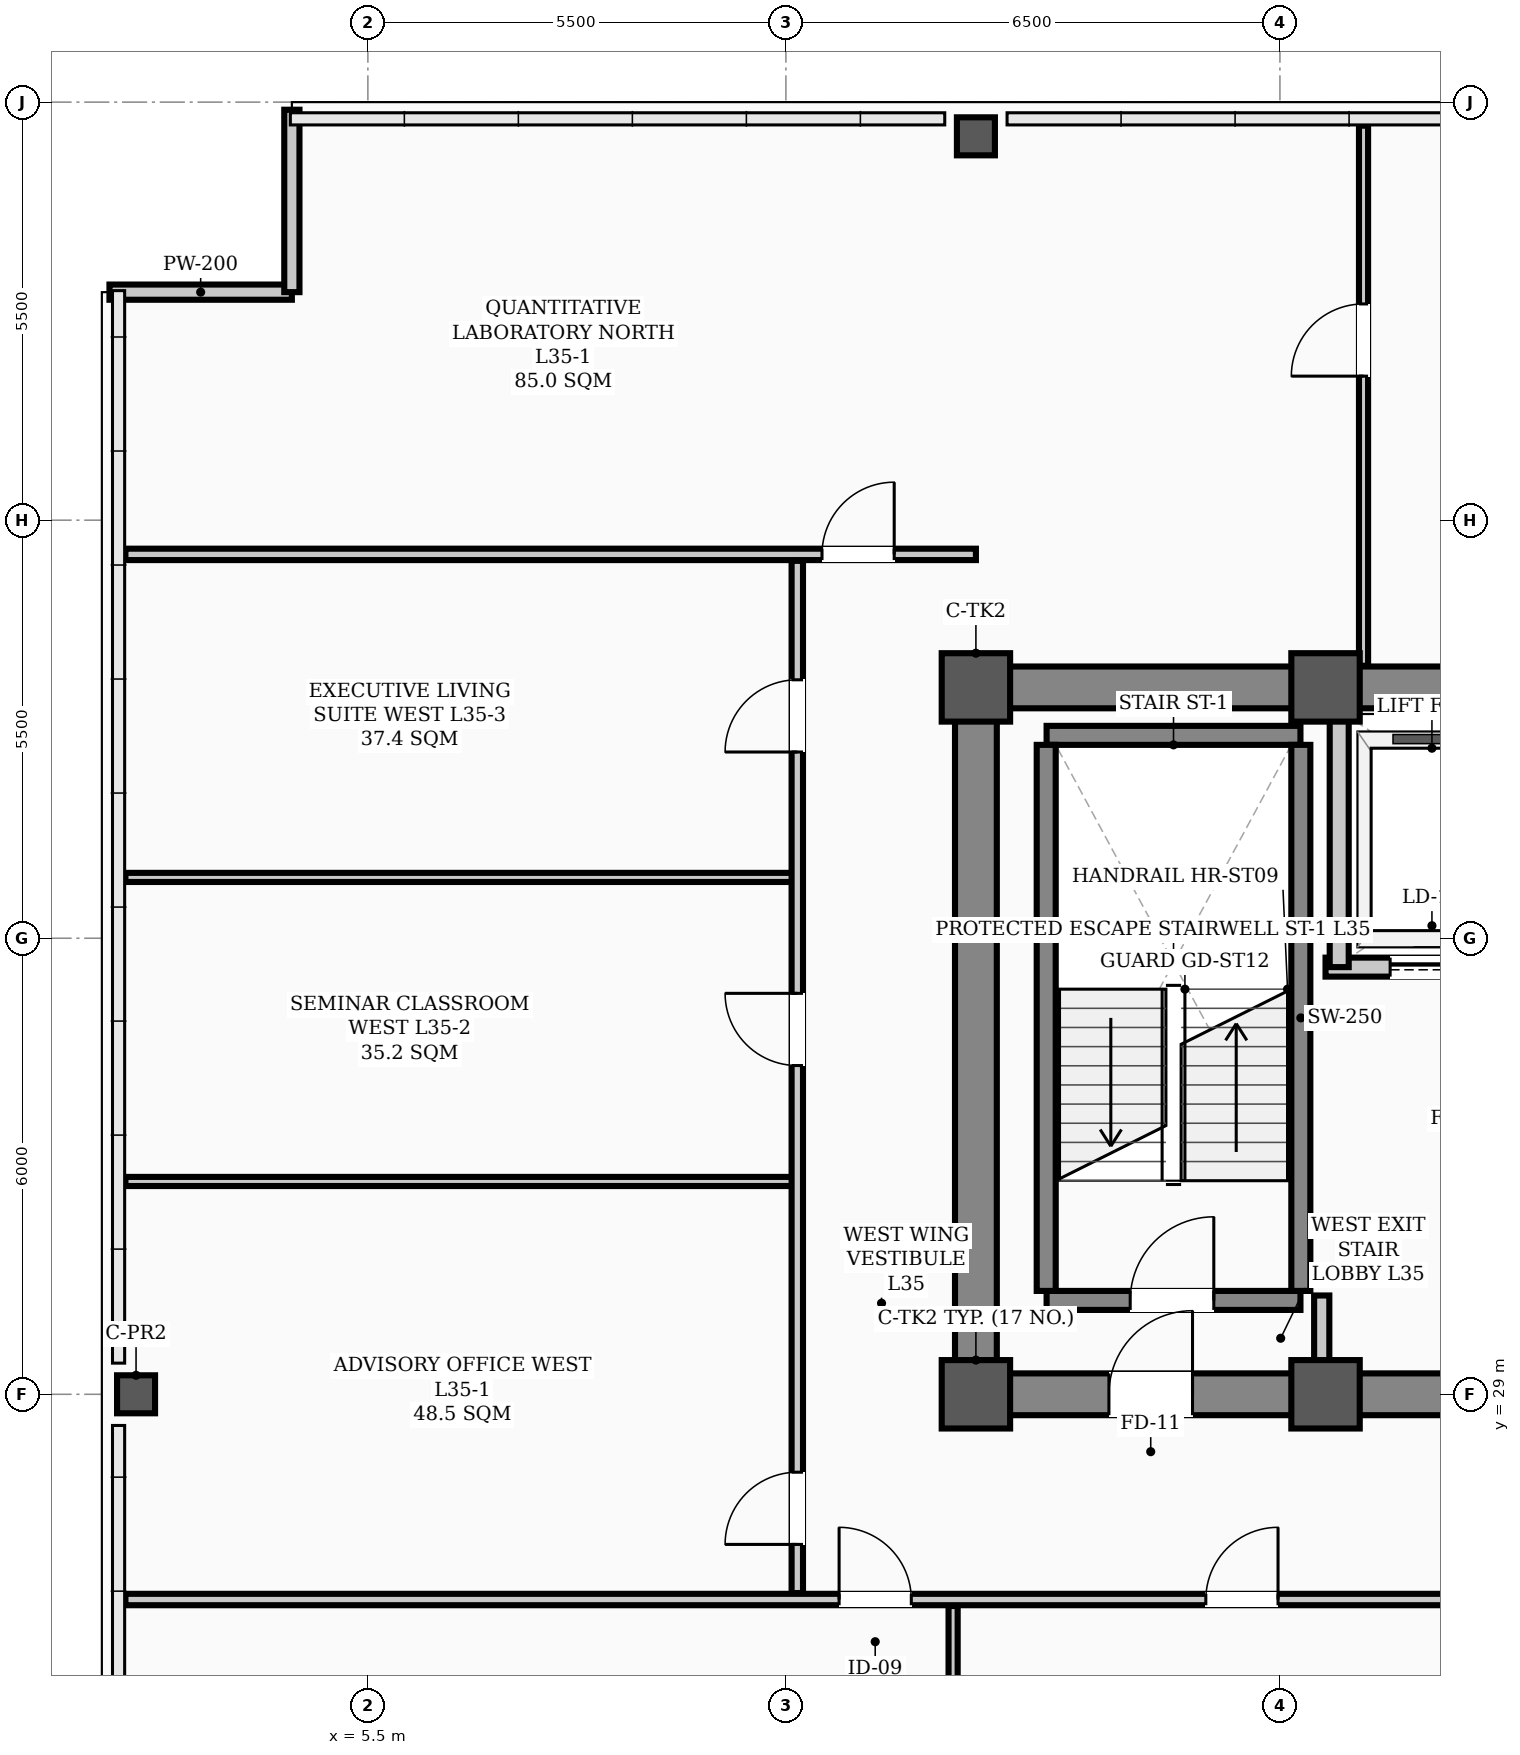
"""IFC4 building model, lengths in metres.
Left out: names, types, materials, properties, quantities, classifications, styles, units other than length and angle.
Written with IfcOpenShell. Run it as: python <this file> out.ifc"""

import sys

from ifc_helpers import new_model, si_unit, direction, frame, frame_2d, origin, origin_2d, place, context, subcontext, project, spatial, rectangle, hollow_rectangle, extrude, element, fill, save


model = new_model("IFC4")
c1 = context("Model", 3, precision=1e-05, world=origin(), true_north=direction((0.0, 1.0)))
c2 = subcontext(c1, "Body", "Model", "MODEL_VIEW")
j1 = project(units=[si_unit("LENGTHUNIT", "METRE"), si_unit("PLANEANGLEUNIT", "RADIAN")], contexts=[c1])
p1 = place(None, origin())
s1 = spatial("IfcSite", under=j1, at=p1, CompositionType="ELEMENT")
p2 = place(p1, origin())
s2 = spatial("IfcBuilding", under=s1, at=p2, CompositionType="ELEMENT")
p3 = place(p2, frame((0.0, 0.0, 142.2)))
s3 = spatial("IfcBuildingStorey", under=s2, at=p3, CompositionType="ELEMENT", Elevation=142.2)
for number, where, z_axis, x_axis in (
    (1, (13.5, 29.0, 0.0), (0.0, 0.0, 1.0), (1.0, 0.0, 0.0)),
    (2, (13.5, 38.3, 0.0), (0.0, 0.0, 1.0), (1.0, 0.0, 0.0)),
    (3, (18.1, 29.0, 0.0), (0.0, 0.0, 1.0), (1.0, 0.0, 0.0)),
    (4, (18.1, 38.3, 0.0), (0.0, 0.0, 1.0), (1.0, 0.0, 0.0)),
):
    element("IfcColumn", number, at=place(p3, frame(where, z_axis=z_axis, x_axis=x_axis)), inside=s3, PredefinedType="COLUMN", context=c2, shape_type="SweptSolid", body=[
        extrude(hollow_rectangle(XDim=0.9, YDim=0.9, WallThickness=0.035, InnerFilletRadius=0.017, OuterFilletRadius=0.052, at=origin_2d()), origin(), (0.0, 0.0, 1.0), 3.9),
    ])
for number, where, z_axis, x_axis in (
    (5, (2.45, 29.0, 0.0), (0.0, 0.0, 1.0), (1.0, 0.0, 0.0)),
    (6, (13.5, 45.55, 0.0), (0.0, 0.0, 1.0), (1.0, 0.0, 0.0)),
):
    element("IfcColumn", number, at=place(p3, frame(where, z_axis=z_axis, x_axis=x_axis)), inside=s3, PredefinedType="COLUMN", context=c2, shape_type="SweptSolid", body=[
        extrude(hollow_rectangle(XDim=0.5, YDim=0.5, WallThickness=0.024, InnerFilletRadius=0.012, OuterFilletRadius=0.036, at=origin_2d()), origin(), (0.0, 0.0, 1.0), 3.9),
    ])
for number, where, z_axis, x_axis in (
    (7, (2.1, 43.5, 0.0), (0.0, 0.0, 1.0), (1.0, 0.0, 0.0)),
    (8, (4.5, 43.5, 0.0), (0.0, 0.0, 1.0), (0.0, 1.0, 0.0)),
):
    element("IfcWall", number, at=place(p3, frame(where, z_axis=z_axis, x_axis=x_axis)), inside=s3, PredefinedType="PARAPET", context=c2, shape_type="SweptSolid", body=[
        extrude(rectangle(XDim=2.4, YDim=0.2, at=frame_2d((1.2, 0.0))), origin(), (0.0, 0.0, 1.0), 1.2),
    ])
p4 = place(p3, frame((13.5, 29.0, 0.0), z_axis=(0.0, 0.0, 1.0), x_axis=(1.0, 0.0, 0.0)))
e9 = element("IfcWall", 9, at=p4, inside=s3, PredefinedType="SHEAR", context=c2, shape_type="SweptSolid", body=[
    extrude(rectangle(XDim=30.5, YDim=0.55, at=frame_2d((15.25, 0.0))), origin(), (0.0, 0.0, 1.0), 3.72),
])
p5 = place(p4, frame((1.75, 0.0, 0.0)))
e10 = element("IfcOpeningElement", 10, at=p5, cuts=e9, PredefinedType="OPENING", context=c2, shape_type="SweptSolid", body=[
    extrude(rectangle(XDim=1.1, YDim=2.08, at=frame_2d((0.55, 1.04))), frame((0.0, 0.285, 0.0), z_axis=(0.0, -1.0, 0.0), x_axis=(1.0, 0.0, 0.0)), (0.0, 0.0, 1.0), 0.57),
])
p6 = place(p4, frame((26.7, 0.0, 0.0)))
e11 = element("IfcOpeningElement", 11, at=p6, cuts=e9, PredefinedType="OPENING", context=c2, shape_type="SweptSolid", body=[
    extrude(rectangle(XDim=1.1, YDim=2.08, at=frame_2d((0.55, 1.04))), frame((0.0, 0.285, 0.0), z_axis=(0.0, -1.0, 0.0), x_axis=(1.0, 0.0, 0.0)), (0.0, 0.0, 1.0), 0.57),
])
p7 = place(p4, frame((6.8, 0.0, 0.0)))
e12 = element("IfcOpeningElement", 12, at=p7, cuts=e9, PredefinedType="OPENING", context=c2, shape_type="SweptSolid", body=[
    extrude(rectangle(XDim=1.1, YDim=2.08, at=frame_2d((0.55, 1.04))), frame((0.0, 0.285, 0.0), z_axis=(0.0, -1.0, 0.0), x_axis=(1.0, 0.0, 0.0)), (0.0, 0.0, 1.0), 0.57),
])
p8 = place(p4, frame((13.2, 0.0, 0.0)))
e13 = element("IfcOpeningElement", 13, at=p8, cuts=e9, PredefinedType="OPENING", context=c2, shape_type="SweptSolid", body=[
    extrude(rectangle(XDim=1.6, YDim=2.08, at=frame_2d((0.8, 1.04))), frame((0.0, 0.285, 0.0), z_axis=(0.0, -1.0, 0.0), x_axis=(1.0, 0.0, 0.0)), (0.0, 0.0, 1.0), 0.57),
])
p9 = place(p4, frame((19.6, 0.0, 0.0)))
e14 = element("IfcOpeningElement", 14, at=p9, cuts=e9, PredefinedType="OPENING", context=c2, shape_type="SweptSolid", body=[
    extrude(rectangle(XDim=0.9, YDim=2.08, at=frame_2d((0.45, 1.04))), frame((0.0, 0.285, 0.0), z_axis=(0.0, -1.0, 0.0), x_axis=(1.0, 0.0, 0.0)), (0.0, 0.0, 1.0), 0.57),
])
p10 = place(p4, frame((21.6, 0.0, 0.0)))
e15 = element("IfcOpeningElement", 15, at=p10, cuts=e9, PredefinedType="OPENING", context=c2, shape_type="SweptSolid", body=[
    extrude(rectangle(XDim=0.9, YDim=2.08, at=frame_2d((0.45, 1.04))), frame((0.0, 0.285, 0.0), z_axis=(0.0, -1.0, 0.0), x_axis=(1.0, 0.0, 0.0)), (0.0, 0.0, 1.0), 0.57),
])
p11 = place(p3, frame((13.5, 38.3, 0.0), z_axis=(0.0, 0.0, 1.0), x_axis=(1.0, 0.0, 0.0)))
e16 = element("IfcWall", 16, at=p11, inside=s3, PredefinedType="SHEAR", context=c2, shape_type="SweptSolid", body=[
    extrude(rectangle(XDim=30.5, YDim=0.55, at=frame_2d((15.25, 0.0))), origin(), (0.0, 0.0, 1.0), 3.72),
])
p12 = place(p3, frame((13.5, 29.35, 0.0), z_axis=(0.0, 0.0, 1.0), x_axis=(0.0, 1.0, 0.0)))
e17 = element("IfcWall", 17, at=p12, inside=s3, PredefinedType="SHEAR", context=c2, shape_type="SweptSolid", body=[
    extrude(rectangle(XDim=8.6, YDim=0.55, at=frame_2d((4.3, 0.0))), origin(), (0.0, 0.0, 1.0), 3.72),
])
p13 = place(p3, frame((14.43, 30.235, 0.0), z_axis=(0.0, 0.0, 1.0), x_axis=(1.0, 0.0, 0.0)))
e18 = element("IfcWall", 18, at=p13, inside=s3, PredefinedType="STANDARD", context=c2, shape_type="SweptSolid", body=[
    extrude(rectangle(XDim=3.34, YDim=0.25, at=frame_2d((1.67, 0.0))), origin(), (0.0, 0.0, 1.0), 3.72),
])
p14 = place(p13, frame((1.1, 0.0, 0.0)))
e19 = element("IfcOpeningElement", 19, at=p14, cuts=e18, PredefinedType="OPENING", context=c2, shape_type="SweptSolid", body=[
    extrude(rectangle(XDim=1.1, YDim=2.08, at=frame_2d((0.55, 1.04))), frame((0.0, 0.135, 0.0), z_axis=(0.0, -1.0, 0.0), x_axis=(1.0, 0.0, 0.0)), (0.0, 0.0, 1.0), 0.27),
])
p15 = place(p3, frame((14.43, 37.669, 0.0), z_axis=(0.0, 0.0, 1.0), x_axis=(1.0, 0.0, 0.0)))
e20 = element("IfcWall", 20, at=p15, inside=s3, PredefinedType="STANDARD", context=c2, shape_type="SweptSolid", body=[
    extrude(rectangle(XDim=3.34, YDim=0.25, at=frame_2d((1.67, 0.0))), origin(), (0.0, 0.0, 1.0), 3.72),
])
for number, where, z_axis, x_axis in (
    (21, (14.425, 30.36, 0.0), (0.0, 0.0, 1.0), (0.0, 1.0, 0.0)),
    (22, (17.775, 30.36, 0.0), (0.0, 0.0, 1.0), (0.0, 1.0, 0.0)),
):
    element("IfcWall", number, at=place(p3, frame(where, z_axis=z_axis, x_axis=x_axis)), inside=s3, PredefinedType="STANDARD", context=c2, shape_type="SweptSolid", body=[
        extrude(rectangle(XDim=7.184, YDim=0.25, at=frame_2d((3.592, 0.0))), origin(), (0.0, 0.0, 1.0), 3.72),
    ])
p16 = place(p3, frame((18.1, 34.62, 0.0), z_axis=(0.0, 0.0, 1.0), x_axis=(1.0, 0.0, 0.0)))
e23 = element("IfcWall", 23, at=p16, inside=s3, PredefinedType="STANDARD", context=c2, shape_type="SweptSolid", body=[
    extrude(rectangle(XDim=5.35, YDim=0.25, at=frame_2d((2.675, 0.0))), origin(), (0.0, 0.0, 1.0), 3.72),
])
p17 = place(p16, frame((0.85, 0.0, 0.0)))
e24 = element("IfcOpeningElement", 24, at=p17, cuts=e23, PredefinedType="OPENING", context=c2, shape_type="SweptSolid", body=[
    extrude(rectangle(XDim=1.1, YDim=2.08, at=frame_2d((0.55, 1.04))), frame((0.0, 0.135, 0.0), z_axis=(0.0, -1.0, 0.0), x_axis=(1.0, 0.0, 0.0)), (0.0, 0.0, 1.0), 0.27),
])
p18 = place(p16, frame((3.45, 0.0, 0.0)))
e25 = element("IfcOpeningElement", 25, at=p18, cuts=e23, PredefinedType="OPENING", context=c2, shape_type="SweptSolid", body=[
    extrude(rectangle(XDim=1.1, YDim=2.08, at=frame_2d((0.55, 1.04))), frame((0.0, 0.135, 0.0), z_axis=(0.0, -1.0, 0.0), x_axis=(1.0, 0.0, 0.0)), (0.0, 0.0, 1.0), 0.27),
])
p19 = place(p3, frame((18.28, 34.62, 0.0), z_axis=(0.0, 0.0, 1.0), x_axis=(0.0, 1.0, 0.0)))
e26 = element("IfcWall", 26, at=p19, inside=s3, PredefinedType="STANDARD", context=c2, shape_type="SweptSolid", body=[
    extrude(rectangle(XDim=3.33, YDim=0.25, at=frame_2d((1.665, 0.0))), origin(), (0.0, 0.0, 1.0), 3.3),
])
p20 = place(p3, frame((2.31, 26.3, 0.0), z_axis=(0.0, 0.0, 1.0), x_axis=(1.0, 0.0, 0.0)))
e27 = element("IfcWall", 27, at=p20, inside=s3, PredefinedType="PARTITIONING", context=c2, shape_type="SweptSolid", body=[
    extrude(rectangle(XDim=46.38, YDim=0.15, at=frame_2d((23.19, 0.0))), origin(), (0.0, 0.0, 1.0), 3.1),
])
p21 = place(p20, frame((9.39, 0.0, 0.0)))
e28 = element("IfcOpeningElement", 28, at=p21, cuts=e27, PredefinedType="OPENING", context=c2, shape_type="SweptSolid", body=[
    extrude(rectangle(XDim=0.95, YDim=2.08, at=frame_2d((0.475, 1.04))), frame((0.0, 0.085, 0.0), z_axis=(0.0, -1.0, 0.0), x_axis=(1.0, 0.0, 0.0)), (0.0, 0.0, 1.0), 0.17),
])
p22 = place(p20, frame((14.215, 0.0, 0.0)))
e29 = element("IfcOpeningElement", 29, at=p22, cuts=e27, PredefinedType="OPENING", context=c2, shape_type="SweptSolid", body=[
    extrude(rectangle(XDim=0.95, YDim=2.08, at=frame_2d((0.475, 1.04))), frame((0.0, 0.085, 0.0), z_axis=(0.0, -1.0, 0.0), x_axis=(1.0, 0.0, 0.0)), (0.0, 0.0, 1.0), 0.17),
])
p23 = place(p20, frame((19.115, 0.0, 0.0)))
e30 = element("IfcOpeningElement", 30, at=p23, cuts=e27, PredefinedType="OPENING", context=c2, shape_type="SweptSolid", body=[
    extrude(rectangle(XDim=0.95, YDim=2.08, at=frame_2d((0.475, 1.04))), frame((0.0, 0.085, 0.0), z_axis=(0.0, -1.0, 0.0), x_axis=(1.0, 0.0, 0.0)), (0.0, 0.0, 1.0), 0.17),
])
p24 = place(p20, frame((23.065, 0.0, 0.0)))
e31 = element("IfcOpeningElement", 31, at=p24, cuts=e27, PredefinedType="OPENING", context=c2, shape_type="SweptSolid", body=[
    extrude(rectangle(XDim=0.95, YDim=2.08, at=frame_2d((0.475, 1.04))), frame((0.0, 0.085, 0.0), z_axis=(0.0, -1.0, 0.0), x_axis=(1.0, 0.0, 0.0)), (0.0, 0.0, 1.0), 0.17),
])
p25 = place(p20, frame((37.715, 0.0, 0.0)))
e32 = element("IfcOpeningElement", 32, at=p25, cuts=e27, PredefinedType="OPENING", context=c2, shape_type="SweptSolid", body=[
    extrude(rectangle(XDim=0.95, YDim=2.08, at=frame_2d((0.475, 1.04))), frame((0.0, 0.085, 0.0), z_axis=(0.0, -1.0, 0.0), x_axis=(1.0, 0.0, 0.0)), (0.0, 0.0, 1.0), 0.17),
])
p26 = place(p20, frame((43.66, 0.0, 0.0)))
e33 = element("IfcOpeningElement", 33, at=p26, cuts=e27, PredefinedType="OPENING", context=c2, shape_type="SweptSolid", body=[
    extrude(rectangle(XDim=0.95, YDim=2.08, at=frame_2d((0.475, 1.04))), frame((0.0, 0.085, 0.0), z_axis=(0.0, -1.0, 0.0), x_axis=(1.0, 0.0, 0.0)), (0.0, 0.0, 1.0), 0.17),
])
for number, where, z_axis, x_axis in (
    (34, (2.31, 31.8, 0.0), (0.0, 0.0, 1.0), (1.0, 0.0, 0.0)),
    (35, (2.31, 35.8, 0.0), (0.0, 0.0, 1.0), (1.0, 0.0, 0.0)),
):
    element("IfcWall", number, at=place(p3, frame(where, z_axis=z_axis, x_axis=x_axis)), inside=s3, PredefinedType="PARTITIONING", context=c2, shape_type="SweptSolid", body=[
        extrude(rectangle(XDim=8.84, YDim=0.12, at=frame_2d((4.42, 0.0))), origin(), (0.0, 0.0, 1.0), 3.72),
    ])
p27 = place(p3, frame((2.31, 40.05, 0.0), z_axis=(0.0, 0.0, 1.0), x_axis=(1.0, 0.0, 0.0)))
e36 = element("IfcWall", 36, at=p27, inside=s3, PredefinedType="PARTITIONING", context=c2, shape_type="SweptSolid", body=[
    extrude(rectangle(XDim=11.19, YDim=0.15, at=frame_2d((5.595, 0.0))), origin(), (0.0, 0.0, 1.0), 3.1),
])
p28 = place(p27, frame((9.165, 0.0, 0.0)))
e37 = element("IfcOpeningElement", 37, at=p28, cuts=e36, PredefinedType="OPENING", context=c2, shape_type="SweptSolid", body=[
    extrude(rectangle(XDim=0.95, YDim=2.08, at=frame_2d((0.475, 1.04))), frame((0.0, 0.085, 0.0), z_axis=(0.0, -1.0, 0.0), x_axis=(1.0, 0.0, 0.0)), (0.0, 0.0, 1.0), 0.17),
])
p29 = place(p3, frame((18.05, 29.285, 0.0), z_axis=(0.0, 0.0, 1.0), x_axis=(0.0, 1.0, 0.0)))
e38 = element("IfcWall", 38, at=p29, inside=s3, PredefinedType="STANDARD", context=c2, shape_type="SweptSolid", body=[
    extrude(rectangle(XDim=1.015, YDim=0.2, at=frame_2d((0.508, 0.0))), origin(), (0.0, 0.0, 1.0), 3.3),
])
p30 = place(p3, frame((11.15, 26.385, 0.0), z_axis=(0.0, 0.0, 1.0), x_axis=(0.0, 1.0, 0.0)))
e39 = element("IfcWall", 39, at=p30, inside=s3, PredefinedType="PARTITIONING", context=c2, shape_type="SweptSolid", body=[
    extrude(rectangle(XDim=13.58, YDim=0.15, at=frame_2d((6.79, 0.0))), origin(), (0.0, 0.0, 1.0), 3.0),
])
p31 = place(p30, frame((0.64, 0.0, 0.0)))
e40 = element("IfcOpeningElement", 40, at=p31, cuts=e39, PredefinedType="OPENING", context=c2, shape_type="SweptSolid", body=[
    extrude(rectangle(XDim=0.95, YDim=2.08, at=frame_2d((0.475, 1.04))), frame((0.0, 0.085, 0.0), z_axis=(0.0, -1.0, 0.0), x_axis=(1.0, 0.0, 0.0)), (0.0, 0.0, 1.0), 0.17),
])
p32 = place(p30, frame((6.94, 0.0, 0.0)))
e41 = element("IfcOpeningElement", 41, at=p32, cuts=e39, PredefinedType="OPENING", context=c2, shape_type="SweptSolid", body=[
    extrude(rectangle(XDim=0.95, YDim=2.08, at=frame_2d((0.475, 1.04))), frame((0.0, 0.085, 0.0), z_axis=(0.0, -1.0, 0.0), x_axis=(1.0, 0.0, 0.0)), (0.0, 0.0, 1.0), 0.17),
])
p33 = place(p30, frame((11.065, 0.0, 0.0)))
e42 = element("IfcOpeningElement", 42, at=p33, cuts=e39, PredefinedType="OPENING", context=c2, shape_type="SweptSolid", body=[
    extrude(rectangle(XDim=0.95, YDim=2.08, at=frame_2d((0.475, 1.04))), frame((0.0, 0.085, 0.0), z_axis=(0.0, -1.0, 0.0), x_axis=(1.0, 0.0, 0.0)), (0.0, 0.0, 1.0), 0.17),
])
p34 = place(p3, frame((13.2, 16.31, 0.0), z_axis=(0.0, 0.0, 1.0), x_axis=(0.0, 1.0, 0.0)))
e43 = element("IfcWall", 43, at=p34, inside=s3, PredefinedType="PARTITIONING", context=c2, shape_type="SweptSolid", body=[
    extrude(rectangle(XDim=9.905, YDim=0.12, at=frame_2d((4.953, 0.0))), origin(), (0.0, 0.0, 1.0), 3.0),
])
p35 = place(p3, frame((18.6, 38.585, 0.0), z_axis=(0.0, 0.0, 1.0), x_axis=(0.0, 1.0, 0.0)))
e44 = element("IfcWall", 44, at=p35, inside=s3, PredefinedType="PARTITIONING", context=c2, shape_type="SweptSolid", body=[
    extrude(rectangle(XDim=7.105, YDim=0.12, at=frame_2d((3.552, 0.0))), origin(), (0.0, 0.0, 1.0), 3.212),
])
p36 = place(p35, frame((3.81, 0.0, 0.0)))
e45 = element("IfcOpeningElement", 45, at=p36, cuts=e44, PredefinedType="OPENING", context=c2, shape_type="SweptSolid", body=[
    extrude(rectangle(XDim=0.95, YDim=2.08, at=frame_2d((0.475, 1.04))), frame((0.0, 0.07, 0.0), z_axis=(0.0, -1.0, 0.0), x_axis=(1.0, 0.0, 0.0)), (0.0, 0.0, 1.0), 0.14),
])
p37 = place(p14, origin())
e46 = element("IfcDoor", 46, at=p37, inside=s3, OperationType="SINGLE_SWING_RIGHT", PredefinedType="DOOR", context=c2, shape_type="SweptSolid", body=[
    extrude(rectangle(XDim=1.1, YDim=2.08, at=frame_2d((0.55, 1.04))), frame((0.0, 0.025, 0.0), z_axis=(0.0, -1.0, 0.0), x_axis=(1.0, 0.0, 0.0)), (0.0, 0.0, 1.0), 0.05),
])
fill(e19, e46)
p38 = place(p5, origin())
e47 = element("IfcDoor", 47, at=p38, inside=s3, OperationType="SINGLE_SWING_RIGHT", PredefinedType="DOOR", context=c2, shape_type="SweptSolid", body=[
    extrude(rectangle(XDim=1.1, YDim=2.08, at=frame_2d((0.55, 1.04))), frame((0.0, 0.025, 0.0), z_axis=(0.0, -1.0, 0.0), x_axis=(1.0, 0.0, 0.0)), (0.0, 0.0, 1.0), 0.05),
])
fill(e10, e47)
p39 = place(p21, origin())
e48 = element("IfcDoor", 48, at=p39, inside=s3, OperationType="SINGLE_SWING_LEFT", PredefinedType="DOOR", context=c2, shape_type="SweptSolid", body=[
    extrude(rectangle(XDim=0.95, YDim=2.08, at=frame_2d((0.475, 1.04))), frame((0.0, 0.025, 0.0), z_axis=(0.0, -1.0, 0.0), x_axis=(1.0, 0.0, 0.0)), (0.0, 0.0, 1.0), 0.05),
])
fill(e28, e48)
p40 = place(p22, origin())
e49 = element("IfcDoor", 49, at=p40, inside=s3, OperationType="SINGLE_SWING_RIGHT", PredefinedType="DOOR", context=c2, shape_type="SweptSolid", body=[
    extrude(rectangle(XDim=0.95, YDim=2.08, at=frame_2d((0.475, 1.04))), frame((0.0, 0.025, 0.0), z_axis=(0.0, -1.0, 0.0), x_axis=(1.0, 0.0, 0.0)), (0.0, 0.0, 1.0), 0.05),
])
fill(e29, e49)
p41 = place(p31, origin())
e50 = element("IfcDoor", 50, at=p41, inside=s3, OperationType="SINGLE_SWING_LEFT", PredefinedType="DOOR", context=c2, shape_type="SweptSolid", body=[
    extrude(rectangle(XDim=0.95, YDim=2.08, at=frame_2d((0.475, 1.04))), frame((0.0, 0.025, 0.0), z_axis=(0.0, -1.0, 0.0), x_axis=(1.0, 0.0, 0.0)), (0.0, 0.0, 1.0), 0.05),
])
fill(e40, e50)
p42 = place(p32, origin())
e51 = element("IfcDoor", 51, at=p42, inside=s3, OperationType="SINGLE_SWING_RIGHT", PredefinedType="DOOR", context=c2, shape_type="SweptSolid", body=[
    extrude(rectangle(XDim=0.95, YDim=2.08, at=frame_2d((0.475, 1.04))), frame((0.0, 0.025, 0.0), z_axis=(0.0, -1.0, 0.0), x_axis=(1.0, 0.0, 0.0)), (0.0, 0.0, 1.0), 0.05),
])
fill(e41, e51)
p43 = place(p33, origin())
e52 = element("IfcDoor", 52, at=p43, inside=s3, OperationType="SINGLE_SWING_LEFT", PredefinedType="DOOR", context=c2, shape_type="SweptSolid", body=[
    extrude(rectangle(XDim=0.95, YDim=2.08, at=frame_2d((0.475, 1.04))), frame((0.0, 0.025, 0.0), z_axis=(0.0, -1.0, 0.0), x_axis=(1.0, 0.0, 0.0)), (0.0, 0.0, 1.0), 0.05),
])
fill(e42, e52)
p44 = place(p28, origin())
e53 = element("IfcDoor", 53, at=p44, inside=s3, OperationType="SINGLE_SWING_RIGHT", PredefinedType="DOOR", context=c2, shape_type="SweptSolid", body=[
    extrude(rectangle(XDim=0.95, YDim=2.08, at=frame_2d((0.475, 1.04))), frame((0.0, 0.025, 0.0), z_axis=(0.0, -1.0, 0.0), x_axis=(1.0, 0.0, 0.0)), (0.0, 0.0, 1.0), 0.05),
])
fill(e37, e53)
p45 = place(p36, origin())
e54 = element("IfcDoor", 54, at=p45, inside=s3, OperationType="SINGLE_SWING_LEFT", PredefinedType="DOOR", context=c2, shape_type="SweptSolid", body=[
    extrude(rectangle(XDim=0.95, YDim=2.08, at=frame_2d((0.475, 1.04))), frame((0.0, 0.025, 0.0), z_axis=(0.0, -1.0, 0.0), x_axis=(1.0, 0.0, 0.0)), (0.0, 0.0, 1.0), 0.05),
])
fill(e45, e54)
p46 = place(p17, origin())
e55 = element("IfcDoor", 55, at=p46, inside=s3, OperationType="SLIDING_TO_LEFT", PredefinedType="DOOR", context=c2, shape_type="SweptSolid", body=[
    extrude(rectangle(XDim=1.1, YDim=2.08, at=frame_2d((0.55, 1.04))), frame((0.0, 0.025, 0.0), z_axis=(0.0, -1.0, 0.0), x_axis=(1.0, 0.0, 0.0)), (0.0, 0.0, 1.0), 0.05),
])
fill(e24, e55)
save(model, sys.argv[1])
